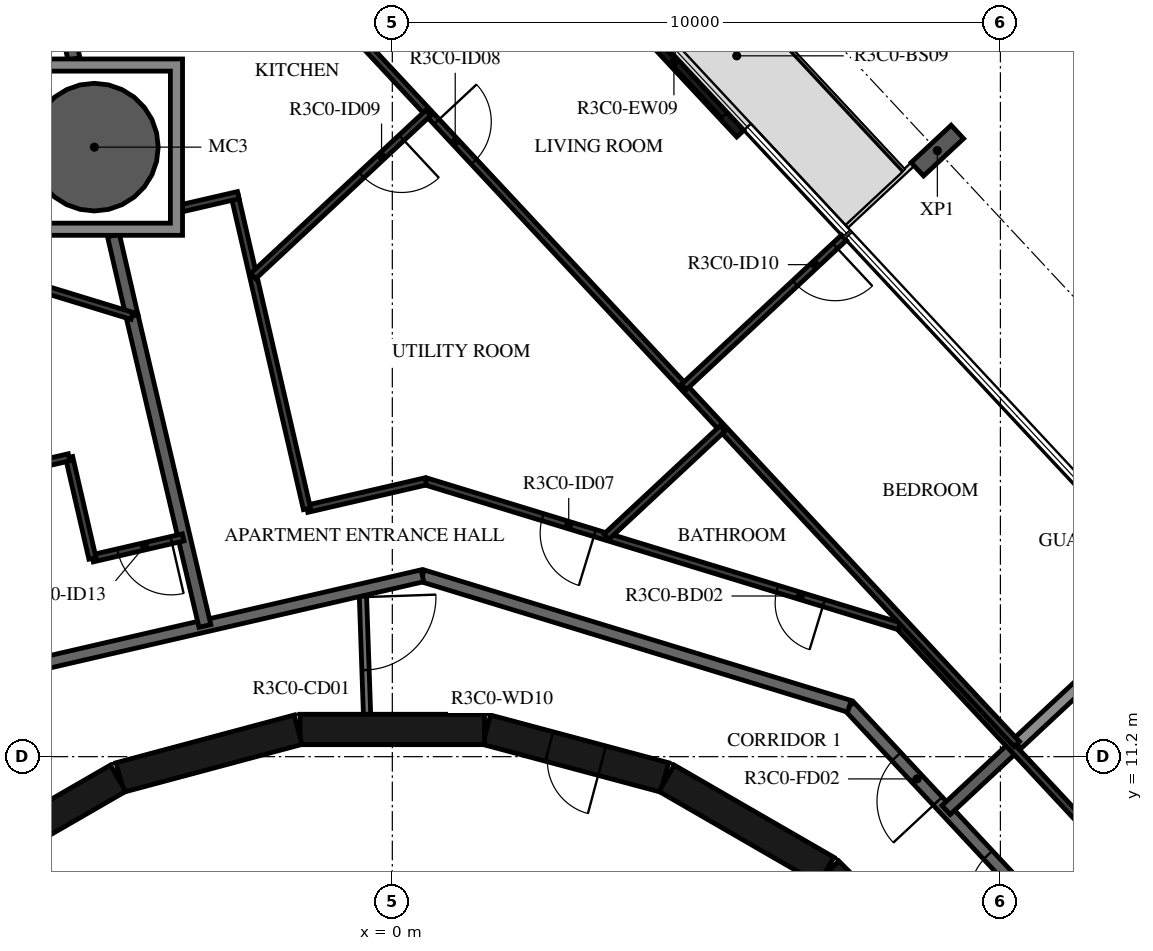
"""IFC4 building model, lengths in metres.
Left out: names, types, materials, properties, quantities, classifications, styles, units other than length and angle.
Written with IfcOpenShell. Run it as: python <this file> out.ifc"""

import sys

from ifc_helpers import new_model, si_unit, direction, frame, frame_2d, origin, origin_2d, place, context, subcontext, project, spatial, polyline, rectangle, hollow_circle, i_section, outline, extrude, element, fill, save


model = new_model("IFC4")
c1 = context("Model", 3, precision=1e-05, world=origin(), true_north=direction((0.0, 1.0)))
c2 = subcontext(c1, "Body", "Model", "MODEL_VIEW")
j1 = project(units=[si_unit("LENGTHUNIT", "METRE"), si_unit("PLANEANGLEUNIT", "RADIAN")], contexts=[c1])
p1 = place(None, origin())
s1 = spatial("IfcSite", under=j1, at=p1, CompositionType="ELEMENT")
p2 = place(p1, origin())
s2 = spatial("IfcBuilding", under=s1, at=p2, CompositionType="ELEMENT")
p3 = place(p2, frame((0.0, 0.0, 134.4)))
s3 = spatial("IfcBuildingStorey", under=s2, at=p3, CompositionType="ELEMENT", Elevation=134.4)
p4 = place(p3, frame((-4.9, 21.223, -0.38), z_axis=(0.0, 0.0, 1.0), x_axis=(1.0, 0.0, 0.0)))
e1 = element("IfcColumn", 1, at=p4, inside=s3, PredefinedType="COLUMN", context=c2, shape_type="SweptSolid", body=[
    extrude(hollow_circle(Radius=1.05, WallThickness=0.05, at=origin_2d()), origin(), (0.0, 0.0, 1.0), 3.5),
])
p5 = place(p3, frame((8.963, 21.167, -0.38), z_axis=(0.0, 0.0, 1.0), x_axis=(0.68199801865, -0.731354019992, 0.0)))
e2 = element("IfcColumn", 2, at=p5, inside=s3, PredefinedType="COLUMN", context=c2, shape_type="SweptSolid", body=[
    extrude(i_section(OverallWidth=0.3, OverallDepth=0.9, WebThickness=0.019, FlangeThickness=0.035, FilletRadius=0.03, at=origin_2d()), origin(), (0.0, 0.0, 1.0), 3.5),
])
p6 = place(p3, frame((5.722, 21.446, 0.0), z_axis=(0.0, 0.0, 1.0), x_axis=(-0.681994703002, 0.731357111866, 0.0)))
e3 = element("IfcWall", 3, at=p6, inside=s3, PredefinedType="STANDARD", context=c2, shape_type="SweptSolid", body=[
    extrude(rectangle(XDim=3.2, YDim=0.16, at=frame_2d((1.6, 0.0))), origin(), (0.0, 0.0, 1.0), 3.12),
])
p7 = place(p6, frame((0.4, 0.0, 0.0)))
e4 = element("IfcOpeningElement", 4, at=p7, cuts=e3, PredefinedType="OPENING", context=c2, shape_type="SweptSolid", body=[
    extrude(rectangle(XDim=2.4, YDim=2.4, at=frame_2d((1.2, 1.2))), frame((0.0, 0.09, 0.0), z_axis=(0.0, -1.0, 0.0), x_axis=(1.0, 0.0, 0.0)), (0.0, 0.0, 1.0), 0.18),
])
p8 = place(p3, frame((9.308, 7.164, 0.0), z_axis=(0.0, 0.0, 1.0), x_axis=(-0.707106781187, 0.707106781187, 0.0)))
e5 = element("IfcWall", 5, at=p8, inside=s3, PredefinedType="SHEAR", context=c2, shape_type="SweptSolid", body=[
    extrude(rectangle(XDim=3.032, YDim=0.5, at=frame_2d((1.516, 0.0))), origin(), (0.0, 0.0, 1.0), 3.12),
])
p9 = place(p8, frame((0.416, 0.0, 0.0)))
e6 = element("IfcOpeningElement", 6, at=p9, cuts=e5, PredefinedType="OPENING", context=c2, shape_type="SweptSolid", body=[
    extrude(rectangle(XDim=1.2, YDim=2.1, at=frame_2d((0.6, 1.05))), frame((0.0, 0.26, 0.0), z_axis=(0.0, -1.0, 0.0), x_axis=(1.0, 0.0, 0.0)), (0.0, 0.0, 1.0), 0.52),
])
p10 = place(p3, frame((7.137, 9.329, 0.0), z_axis=(0.0, 0.0, 1.0), x_axis=(-0.865975092491, 0.500087131594, 0.0)))
e7 = element("IfcWall", 7, at=p10, inside=s3, PredefinedType="SHEAR", context=c2, shape_type="SweptSolid", body=[
    extrude(rectangle(XDim=3.033, YDim=0.5, at=frame_2d((1.516, 0.0))), origin(), (0.0, 0.0, 1.0), 3.12),
])
p11 = place(p3, frame((4.479, 10.858, 0.0), z_axis=(0.0, 0.0, 1.0), x_axis=(-0.965948410781, 0.258734743916, 0.0)))
e8 = element("IfcWall", 8, at=p11, inside=s3, PredefinedType="SHEAR", context=c2, shape_type="SweptSolid", body=[
    extrude(rectangle(XDim=3.033, YDim=0.5, at=frame_2d((1.516, 0.0))), origin(), (0.0, 0.0, 1.0), 3.12),
])
p12 = place(p11, frame((1.066, 0.0, 0.0)))
e9 = element("IfcOpeningElement", 9, at=p12, cuts=e8, PredefinedType="OPENING", context=c2, shape_type="SweptSolid", body=[
    extrude(rectangle(XDim=0.9, YDim=2.1, at=frame_2d((0.45, 1.05))), frame((0.0, 0.26, 0.0), z_axis=(0.0, -1.0, 0.0), x_axis=(1.0, 0.0, 0.0)), (0.0, 0.0, 1.0), 0.52),
])
for number, where, z_axis, x_axis in (
    (10, (1.516, 11.647, 0.0), (0.0, 0.0, 1.0), (-1.0, 0.0, 0.0)),
    (11, (-1.55, 11.643, 0.0), (0.0, 0.0, 1.0), (-0.966, -0.259, 0.0)),
    (12, (-4.51, 10.845, 0.0), (0.0, 0.0, 1.0), (-0.866, -0.5, 0.0)),
):
    element("IfcWall", number, at=place(p3, frame(where, z_axis=z_axis, x_axis=x_axis)), inside=s3, PredefinedType="SHEAR", context=c2, shape_type="SweptSolid", body=[
        extrude(rectangle(XDim=3.033, YDim=0.5, at=frame_2d((1.516, 0.0))), origin(), (0.0, 0.0, 1.0), 3.12),
    ])
p13 = place(p3, frame((-0.487, 13.948, 0.0), z_axis=(0.0, 0.0, 1.0), x_axis=(0.034859752231, -0.999392214135, 0.0)))
e13 = element("IfcWall", 13, at=p13, inside=s3, PredefinedType="PARTITIONING", context=c2, shape_type="SweptSolid", body=[
    extrude(rectangle(XDim=2.052, YDim=0.12, at=frame_2d((1.026, 0.0))), origin(), (0.0, 0.0, 1.0), 3.12),
])
p14 = place(p13, frame((0.125, 0.0, 0.0)))
e14 = element("IfcOpeningElement", 14, at=p14, cuts=e13, PredefinedType="OPENING", context=c2, shape_type="SweptSolid", body=[
    extrude(rectangle(XDim=1.2, YDim=2.1, at=frame_2d((0.6, 1.05))), frame((0.0, 0.07, 0.0), z_axis=(0.0, -1.0, 0.0), x_axis=(1.0, 0.0, 0.0)), (0.0, 0.0, 1.0), 0.14),
])
p15 = place(p3, frame((12.523, 6.659, 0.0), z_axis=(0.0, 0.0, 1.0), x_axis=(-0.682001841105, 0.731350455479, 0.0)))
e15 = element("IfcWall", 15, at=p15, inside=s3, PredefinedType="STANDARD", context=c2, shape_type="SweptSolid", body=[
    extrude(rectangle(XDim=7.342, YDim=0.2, at=frame_2d((3.671, 0.0))), origin(), (0.0, 0.0, 1.0), 3.12),
])
p16 = place(p15, frame((3.0, 0.0, 0.0)))
e16 = element("IfcOpeningElement", 16, at=p16, cuts=e15, PredefinedType="OPENING", context=c2, shape_type="SweptSolid", body=[
    extrude(rectangle(XDim=1.0, YDim=2.1, at=frame_2d((0.5, 1.05))), frame((0.0, 0.11, 0.0), z_axis=(0.0, -1.0, 0.0), x_axis=(1.0, 0.0, 0.0)), (0.0, 0.0, 1.0), 0.22),
])
p17 = place(p15, frame((5.209, 0.0, 0.0)))
e17 = element("IfcOpeningElement", 17, at=p17, cuts=e15, PredefinedType="OPENING", context=c2, shape_type="SweptSolid", body=[
    extrude(rectangle(XDim=1.0, YDim=2.1, at=frame_2d((0.5, 1.05))), frame((0.0, 0.11, 0.0), z_axis=(0.0, -1.0, 0.0), x_axis=(1.0, 0.0, 0.0)), (0.0, 0.0, 1.0), 0.22),
])
p18 = place(p3, frame((7.516, 12.028, 0.0), z_axis=(0.0, 0.0, 1.0), x_axis=(-0.956306642771, 0.292365533182, 0.0)))
e18 = element("IfcWall", 18, at=p18, inside=s3, PredefinedType="STANDARD", context=c2, shape_type="SweptSolid", body=[
    extrude(rectangle(XDim=7.342, YDim=0.2, at=frame_2d((3.671, 0.0))), origin(), (0.0, 0.0, 1.0), 3.12),
])
p19 = place(p3, frame((0.495, 14.175, 0.0), z_axis=(0.0, 0.0, 1.0), x_axis=(-0.974376622151, -0.224922649383, 0.0)))
e19 = element("IfcWall", 19, at=p19, inside=s3, PredefinedType="STANDARD", context=c2, shape_type="SweptSolid", body=[
    extrude(rectangle(XDim=7.342, YDim=0.2, at=frame_2d((3.671, 0.0))), origin(), (0.0, 0.0, 1.0), 3.12),
])
p20 = place(p3, frame((10.233, 11.372, 0.0), z_axis=(0.0, 0.0, 1.0), x_axis=(-0.731329353292, -0.682024469513, 0.0)))
e20 = element("IfcWall", 20, at=p20, inside=s3, PredefinedType="STANDARD", context=c2, shape_type="SweptSolid", body=[
    extrude(rectangle(XDim=1.54, YDim=0.2, at=frame_2d((0.77, 0.0))), origin(), (0.0, 0.0, 1.0), 3.12),
])
p21 = place(p3, frame((12.903, 13.862, 0.0), z_axis=(0.0, 0.0, 1.0), x_axis=(-0.731328084739, -0.682025829769, 0.0)))
e21 = element("IfcWall", 21, at=p21, inside=s3, PredefinedType="STANDARD", context=c2, shape_type="SweptSolid", body=[
    extrude(rectangle(XDim=3.6, YDim=0.2, at=frame_2d((1.8, 0.0))), origin(), (0.0, 0.0, 1.0), 2.73),
])
p22 = place(p3, frame((-4.281, 18.448, 0.0), z_axis=(0.0, 0.0, 1.0), x_axis=(0.228867856942, -0.973457499873, 0.0)))
e22 = element("IfcWall", 22, at=p22, inside=s3, PredefinedType="STANDARD", context=c2, shape_type="SweptSolid", body=[
    extrude(rectangle(XDim=5.238, YDim=0.2, at=frame_2d((2.619, 0.0))), origin(), (0.0, 0.0, 1.0), 3.12),
])
p23 = place(p3, frame((-4.586, 19.771, 0.0), z_axis=(0.0, 0.0, 1.0), x_axis=(0.224898895484, -0.974382105136, 0.0)))
e23 = element("IfcWall", 23, at=p23, inside=s3, PredefinedType="STANDARD", context=c2, shape_type="SweptSolid", body=[
    extrude(rectangle(XDim=1.358, YDim=0.2, at=frame_2d((0.679, 0.0))), origin(), (0.0, 0.0, 1.0), 3.12),
])
p24 = place(p3, frame((-6.687, 28.966, 0.0), z_axis=(0.0, 0.0, 1.0), x_axis=(0.224945100086, -0.974371439415, 0.0)))
e24 = element("IfcWall", 24, at=p24, inside=s3, PredefinedType="STANDARD", context=c2, shape_type="SweptSolid", body=[
    extrude(rectangle(XDim=6.458, YDim=0.2, at=frame_2d((3.229, 0.0))), origin(), (0.0, 0.0, 1.0), 3.12),
])
p25 = place(p3, frame((13.894, 7.388, 0.0), z_axis=(0.0, 0.0, 1.0), x_axis=(-0.681994622729, 0.731357186721, 0.0)))
e25 = element("IfcWall", 25, at=p25, inside=s3, PredefinedType="PARTITIONING", context=c2, shape_type="SweptSolid", body=[
    extrude(rectangle(XDim=8.146, YDim=0.12, at=frame_2d((4.073, 0.0))), origin(), (0.0, 0.0, 1.0), 3.12),
])
p26 = place(p25, frame((0.2, 0.0, 0.0)))
e26 = element("IfcOpeningElement", 26, at=p26, cuts=e25, PredefinedType="OPENING", context=c2, shape_type="SweptSolid", body=[
    extrude(rectangle(XDim=0.9, YDim=2.1, at=frame_2d((0.45, 1.05))), frame((0.0, 0.07, 0.0), z_axis=(0.0, -1.0, 0.0), x_axis=(1.0, 0.0, 0.0)), (0.0, 0.0, 1.0), 0.14),
])
p27 = place(p3, frame((8.339, 13.345, 0.0), z_axis=(0.0, 0.0, 1.0), x_axis=(-0.956310145342, 0.292354076276, 0.0)))
e27 = element("IfcWall", 27, at=p27, inside=s3, PredefinedType="PARTITIONING", context=c2, shape_type="SweptSolid", body=[
    extrude(rectangle(XDim=8.146, YDim=0.12, at=frame_2d((4.073, 0.0))), origin(), (0.0, 0.0, 1.0), 3.12),
])
p28 = place(p27, frame((1.3, 0.0, 0.0)))
e28 = element("IfcOpeningElement", 28, at=p28, cuts=e27, PredefinedType="OPENING", context=c2, shape_type="SweptSolid", body=[
    extrude(rectangle(XDim=0.8, YDim=2.1, at=frame_2d((0.4, 1.05))), frame((0.0, 0.07, 0.0), z_axis=(0.0, -1.0, 0.0), x_axis=(1.0, 0.0, 0.0)), (0.0, 0.0, 1.0), 0.14),
])
p29 = place(p27, frame((5.237, 0.0, 0.0)))
e29 = element("IfcOpeningElement", 29, at=p29, cuts=e27, PredefinedType="OPENING", context=c2, shape_type="SweptSolid", body=[
    extrude(rectangle(XDim=0.9, YDim=2.1, at=frame_2d((0.45, 1.05))), frame((0.0, 0.07, 0.0), z_axis=(0.0, -1.0, 0.0), x_axis=(1.0, 0.0, 0.0)), (0.0, 0.0, 1.0), 0.14),
])
p30 = place(p3, frame((0.549, 15.727, 0.0), z_axis=(0.0, 0.0, 1.0), x_axis=(-0.97436861061, -0.224957352975, 0.0)))
e30 = element("IfcWall", 30, at=p30, inside=s3, PredefinedType="PARTITIONING", context=c2, shape_type="SweptSolid", body=[
    extrude(rectangle(XDim=2.004, YDim=0.12, at=frame_2d((1.002, 0.0))), origin(), (0.0, 0.0, 1.0), 3.12),
])
p31 = place(p3, frame((-1.404, 15.276, 0.0), z_axis=(0.0, 0.0, 1.0), x_axis=(-0.224947305813, 0.974370930194, 0.0)))
e31 = element("IfcWall", 31, at=p31, inside=s3, PredefinedType="PARTITIONING", context=c2, shape_type="SweptSolid", body=[
    extrude(rectangle(XDim=5.28, YDim=0.12, at=frame_2d((2.64, 0.0))), origin(), (0.0, 0.0, 1.0), 3.12),
])
p32 = place(p3, frame((-2.533, 20.434, 0.0), z_axis=(0.0, 0.0, 1.0), x_axis=(-0.974387124574, -0.224877147491, 0.0)))
e32 = element("IfcWall", 32, at=p32, inside=s3, PredefinedType="PARTITIONING", context=c2, shape_type="SweptSolid", body=[
    extrude(rectangle(XDim=1.011, YDim=0.12, at=frame_2d((0.505, 0.0))), origin(), (0.0, 0.0, 1.0), 3.12),
])
p33 = place(p3, frame((-1.539, 24.071, 0.0), z_axis=(0.0, 0.0, 1.0), x_axis=(0.68200220595, -0.731350115252, 0.0)))
e33 = element("IfcWall", 33, at=p33, inside=s3, PredefinedType="PARTITIONING", context=c2, shape_type="SweptSolid", body=[
    extrude(rectangle(XDim=17.316, YDim=0.12, at=frame_2d((8.658, 0.0))), origin(), (0.0, 0.0, 1.0), 3.12),
])
p34 = place(p33, frame((3.323, 0.0, 0.0)))
e34 = element("IfcOpeningElement", 34, at=p34, cuts=e33, PredefinedType="OPENING", context=c2, shape_type="SweptSolid", body=[
    extrude(rectangle(XDim=0.9, YDim=2.1, at=frame_2d((0.45, 1.05))), frame((0.0, 0.07, 0.0), z_axis=(0.0, -1.0, 0.0), x_axis=(1.0, 0.0, 0.0)), (0.0, 0.0, 1.0), 0.14),
])
p35 = place(p33, frame((0.2, 0.0, 0.0)))
e35 = element("IfcOpeningElement", 35, at=p35, cuts=e33, PredefinedType="OPENING", context=c2, shape_type="SweptSolid", body=[
    extrude(rectangle(XDim=0.9, YDim=2.1, at=frame_2d((0.45, 1.05))), frame((0.0, 0.07, 0.0), z_axis=(0.0, -1.0, 0.0), x_axis=(1.0, 0.0, 0.0)), (0.0, 0.0, 1.0), 0.14),
])
p36 = place(p3, frame((7.427, 19.734, 0.0), z_axis=(0.0, 0.0, 1.0), x_axis=(-0.73139345201, -0.681955730497, 0.0)))
e36 = element("IfcWall", 36, at=p36, inside=s3, PredefinedType="PARTITIONING", context=c2, shape_type="SweptSolid", body=[
    extrude(rectangle(XDim=3.6, YDim=0.12, at=frame_2d((1.8, 0.0))), origin(), (0.0, 0.0, 1.0), 2.73),
])
p37 = place(p36, frame((0.2, 0.0, 0.0)))
e37 = element("IfcOpeningElement", 37, at=p37, cuts=e36, PredefinedType="OPENING", context=c2, shape_type="SweptSolid", body=[
    extrude(rectangle(XDim=0.9, YDim=2.1, at=frame_2d((0.45, 1.05))), frame((0.0, 0.07, 0.0), z_axis=(0.0, -1.0, 0.0), x_axis=(1.0, 0.0, 0.0)), (0.0, 0.0, 1.0), 0.14),
])
p38 = place(p3, frame((5.431, 16.597, 0.0), z_axis=(0.0, 0.0, 1.0), x_axis=(-0.731378807316, -0.681971436505, 0.0)))
e38 = element("IfcWall", 38, at=p38, inside=s3, PredefinedType="PARTITIONING", context=c2, shape_type="SweptSolid", body=[
    extrude(rectangle(XDim=2.609, YDim=0.12, at=frame_2d((1.305, 0.0))), origin(), (0.0, 0.0, 1.0), 3.12),
])
p39 = place(p3, frame((0.591, 21.787, 0.0), z_axis=(0.0, 0.0, 1.0), x_axis=(-0.731364619453, -0.681986651931, 0.0)))
e39 = element("IfcWall", 39, at=p39, inside=s3, PredefinedType="PARTITIONING", context=c2, shape_type="SweptSolid", body=[
    extrude(rectangle(XDim=3.936, YDim=0.12, at=frame_2d((1.968, 0.0))), origin(), (0.0, 0.0, 1.0), 3.12),
])
p40 = place(p39, frame((0.6, 0.0, 0.0)))
e40 = element("IfcOpeningElement", 40, at=p40, cuts=e39, PredefinedType="OPENING", context=c2, shape_type="SweptSolid", body=[
    extrude(rectangle(XDim=0.9, YDim=2.1, at=frame_2d((0.45, 1.05))), frame((0.0, 0.07, 0.0), z_axis=(0.0, -1.0, 0.0), x_axis=(1.0, 0.0, 0.0)), (0.0, 0.0, 1.0), 0.14),
])
p41 = place(p3, frame((-3.44, 14.806, 0.0), z_axis=(0.0, 0.0, 1.0), x_axis=(-0.974356244071, -0.225010910046, 0.0)))
e41 = element("IfcWall", 41, at=p41, inside=s3, PredefinedType="PARTITIONING", context=c2, shape_type="SweptSolid", body=[
    extrude(rectangle(XDim=1.531, YDim=0.12, at=frame_2d((0.766, 0.0))), origin(), (0.0, 0.0, 1.0), 3.12),
])
p42 = place(p41, frame((0.2, 0.0, 0.0)))
e42 = element("IfcOpeningElement", 42, at=p42, cuts=e41, PredefinedType="OPENING", context=c2, shape_type="SweptSolid", body=[
    extrude(rectangle(XDim=0.9, YDim=2.1, at=frame_2d((0.45, 1.05))), frame((0.0, 0.07, 0.0), z_axis=(0.0, -1.0, 0.0), x_axis=(1.0, 0.0, 0.0)), (0.0, 0.0, 1.0), 0.14),
])
p43 = place(p3, frame((-4.931, 14.461, 0.0), z_axis=(0.0, 0.0, 1.0), x_axis=(-0.224911785629, 0.974379129849, 0.0)))
e43 = element("IfcWall", 43, at=p43, inside=s3, PredefinedType="PARTITIONING", context=c2, shape_type="SweptSolid", body=[
    extrude(rectangle(XDim=1.705, YDim=0.12, at=frame_2d((0.853, 0.0))), origin(), (0.0, 0.0, 1.0), 3.12),
])
p44 = place(p3, frame((-5.315, 16.123, 0.0), z_axis=(0.0, 0.0, 1.0), x_axis=(-0.974352456598, -0.225027310168, 0.0)))
e44 = element("IfcWall", 44, at=p44, inside=s3, PredefinedType="PARTITIONING", context=c2, shape_type="SweptSolid", body=[
    extrude(rectangle(XDim=1.7, YDim=0.12, at=frame_2d((0.85, 0.0))), origin(), (0.0, 0.0, 1.0), 3.12),
])
p45 = place(p3, frame((-9.066, 19.91, 0.0), z_axis=(0.0, 0.0, 1.0), x_axis=(0.956313309797, -0.292343724928, 0.0)))
e45 = element("IfcWall", 45, at=p45, inside=s3, PredefinedType="PARTITIONING", context=c2, shape_type="SweptSolid", body=[
    extrude(rectangle(XDim=5.004, YDim=0.12, at=frame_2d((2.502, 0.0))), origin(), (0.0, 0.0, 1.0), 3.12),
])
p46 = place(p45, frame((0.2, 0.0, 0.0)))
e46 = element("IfcOpeningElement", 46, at=p46, cuts=e45, PredefinedType="OPENING", context=c2, shape_type="SweptSolid", body=[
    extrude(rectangle(XDim=0.9, YDim=2.1, at=frame_2d((0.45, 1.05))), frame((0.0, 0.07, 0.0), z_axis=(0.0, -1.0, 0.0), x_axis=(1.0, 0.0, 0.0)), (0.0, 0.0, 1.0), 0.14),
])
p47 = place(p3, origin())
e47 = element("IfcWall", 47, at=p47, inside=s3, PredefinedType="STANDARD", context=c2, shape_type="SweptSolid", body=[
    extrude(outline(polyline([(-3.45, 22.674), (-3.45, 19.773), (-6.35, 19.773), (-6.35, 22.674), (-3.45, 22.674)]), holes=[polyline([(-6.15, 19.973), (-3.65, 19.973), (-3.65, 22.473), (-6.15, 22.473), (-6.15, 19.973)])]), origin(), (0.0, 0.0, 1.0), 3.12),
])
p48 = place(p7, origin())
e48 = element("IfcDoor", 48, at=p48, inside=s3, OperationType="DOUBLE_DOOR_SLIDING", PredefinedType="DOOR", context=c2, shape_type="SweptSolid", body=[
    extrude(rectangle(XDim=2.4, YDim=2.4, at=frame_2d((1.2, 1.2))), frame((0.0, 0.025, 0.0), z_axis=(0.0, -1.0, 0.0), x_axis=(1.0, 0.0, 0.0)), (0.0, 0.0, 1.0), 0.05),
])
fill(e4, e48)
p49 = place(p12, origin())
e49 = element("IfcDoor", 49, at=p49, inside=s3, OperationType="SINGLE_SWING_LEFT", PredefinedType="DOOR", context=c2, shape_type="SweptSolid", body=[
    extrude(rectangle(XDim=0.9, YDim=2.1, at=frame_2d((0.45, 1.05))), frame((0.0, 0.025, 0.0), z_axis=(0.0, -1.0, 0.0), x_axis=(1.0, 0.0, 0.0)), (0.0, 0.0, 1.0), 0.05),
])
fill(e9, e49)
p50 = place(p16, origin())
e50 = element("IfcDoor", 50, at=p50, inside=s3, OperationType="SINGLE_SWING_LEFT", PredefinedType="DOOR", context=c2, shape_type="SweptSolid", body=[
    extrude(rectangle(XDim=1.0, YDim=2.1, at=frame_2d((0.5, 1.05))), frame((0.0, 0.025, 0.0), z_axis=(0.0, -1.0, 0.0), x_axis=(1.0, 0.0, 0.0)), (0.0, 0.0, 1.0), 0.05),
])
fill(e16, e50)
p51 = place(p17, origin())
e51 = element("IfcDoor", 51, at=p51, inside=s3, OperationType="SINGLE_SWING_RIGHT", PredefinedType="DOOR", context=c2, shape_type="SweptSolid", body=[
    extrude(rectangle(XDim=1.0, YDim=2.1, at=frame_2d((0.5, 1.05))), frame((0.0, 0.025, 0.0), z_axis=(0.0, -1.0, 0.0), x_axis=(1.0, 0.0, 0.0)), (0.0, 0.0, 1.0), 0.05),
])
fill(e17, e51)
p52 = place(p28, origin())
e52 = element("IfcDoor", 52, at=p52, inside=s3, OperationType="SINGLE_SWING_RIGHT", PredefinedType="DOOR", context=c2, shape_type="SweptSolid", body=[
    extrude(rectangle(XDim=0.8, YDim=2.1, at=frame_2d((0.4, 1.05))), frame((0.0, 0.025, 0.0), z_axis=(0.0, -1.0, 0.0), x_axis=(1.0, 0.0, 0.0)), (0.0, 0.0, 1.0), 0.05),
])
fill(e28, e52)
p53 = place(p29, origin())
e53 = element("IfcDoor", 53, at=p53, inside=s3, OperationType="SINGLE_SWING_RIGHT", PredefinedType="DOOR", context=c2, shape_type="SweptSolid", body=[
    extrude(rectangle(XDim=0.9, YDim=2.1, at=frame_2d((0.45, 1.05))), frame((0.0, 0.025, 0.0), z_axis=(0.0, -1.0, 0.0), x_axis=(1.0, 0.0, 0.0)), (0.0, 0.0, 1.0), 0.05),
])
fill(e29, e53)
p54 = place(p34, origin())
e54 = element("IfcDoor", 54, at=p54, inside=s3, OperationType="SINGLE_SWING_RIGHT", PredefinedType="DOOR", context=c2, shape_type="SweptSolid", body=[
    extrude(rectangle(XDim=0.9, YDim=2.1, at=frame_2d((0.45, 1.05))), frame((0.0, 0.025, 0.0), z_axis=(0.0, -1.0, 0.0), x_axis=(1.0, 0.0, 0.0)), (0.0, 0.0, 1.0), 0.05),
])
fill(e34, e54)
p55 = place(p40, origin())
e55 = element("IfcDoor", 55, at=p55, inside=s3, OperationType="SINGLE_SWING_RIGHT", PredefinedType="DOOR", context=c2, shape_type="SweptSolid", body=[
    extrude(rectangle(XDim=0.9, YDim=2.1, at=frame_2d((0.45, 1.05))), frame((0.0, 0.025, 0.0), z_axis=(0.0, -1.0, 0.0), x_axis=(1.0, 0.0, 0.0)), (0.0, 0.0, 1.0), 0.05),
])
fill(e40, e55)
p56 = place(p37, origin())
e56 = element("IfcDoor", 56, at=p56, inside=s3, OperationType="SINGLE_SWING_LEFT", PredefinedType="DOOR", context=c2, shape_type="SweptSolid", body=[
    extrude(rectangle(XDim=0.9, YDim=2.1, at=frame_2d((0.45, 1.05))), frame((0.0, 0.025, 0.0), z_axis=(0.0, -1.0, 0.0), x_axis=(1.0, 0.0, 0.0)), (0.0, 0.0, 1.0), 0.05),
])
fill(e37, e56)
p57 = place(p42, origin())
e57 = element("IfcDoor", 57, at=p57, inside=s3, OperationType="SINGLE_SWING_LEFT", PredefinedType="DOOR", context=c2, shape_type="SweptSolid", body=[
    extrude(rectangle(XDim=0.9, YDim=2.1, at=frame_2d((0.45, 1.05))), frame((0.0, 0.025, 0.0), z_axis=(0.0, -1.0, 0.0), x_axis=(1.0, 0.0, 0.0)), (0.0, 0.0, 1.0), 0.05),
])
fill(e42, e57)
p58 = place(p14, origin())
e58 = element("IfcDoor", 58, at=p58, inside=s3, OperationType="DOUBLE_DOOR_SINGLE_SWING", PredefinedType="DOOR", context=c2, shape_type="SweptSolid", body=[
    extrude(rectangle(XDim=1.2, YDim=2.1, at=frame_2d((0.6, 1.05))), frame((0.0, 0.025, 0.0), z_axis=(0.0, -1.0, 0.0), x_axis=(1.0, 0.0, 0.0)), (0.0, 0.0, 1.0), 0.05),
])
fill(e14, e58)
save(model, sys.argv[1])
